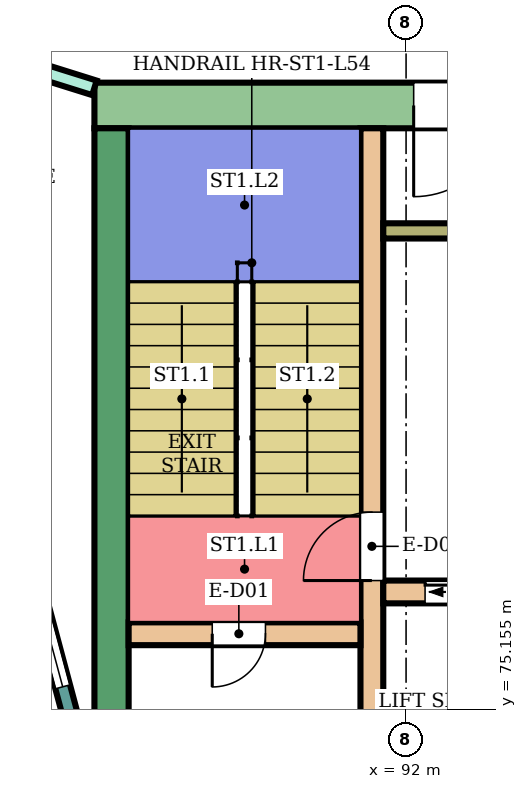
"""IFC4 building model, lengths in metres.
Left out: names, types, materials, properties, quantities, classifications, styles, units other than length and angle.
Written with IfcOpenShell. Run it as: python <this file> out.ifc"""

import sys

from ifc_helpers import new_model, si_unit, direction, frame, frame_2d, origin, place, context, subcontext, project, spatial, rectangle, extrude, element, fill, save


model = new_model("IFC4")
c1 = context("Model", 3, precision=1e-05, world=origin(), true_north=direction((0.0, 1.0)))
c2 = subcontext(c1, "Body", "Model", "MODEL_VIEW")
j1 = project(units=[si_unit("LENGTHUNIT", "METRE"), si_unit("PLANEANGLEUNIT", "RADIAN")], contexts=[c1])
p1 = place(None, origin())
s1 = spatial("IfcSite", under=j1, at=p1, CompositionType="ELEMENT")
p2 = place(p1, origin())
s2 = spatial("IfcBuilding", under=s1, at=p2, CompositionType="ELEMENT")
p3 = place(p2, frame((0.0, 0.0, 237.3)))
s3 = spatial("IfcBuildingStorey", under=s2, at=p3, CompositionType="ELEMENT", Elevation=237.3)
p4 = place(p3, frame((87.9, 83.1, 0.0), z_axis=(0.0, 0.0, 1.0), x_axis=(1.0, 0.0, 0.0)))
e1 = element("IfcWall", 1, at=p4, inside=s3, PredefinedType="SHEAR", context=c2, shape_type="SweptSolid", body=[
    extrude(rectangle(XDim=14.9, YDim=0.6, at=frame_2d((7.45, 0.0))), origin(), (0.0, 0.0, 1.0), 3.88),
])
p5 = place(p4, frame((4.2, 0.0, 0.0)))
e2 = element("IfcOpeningElement", 2, at=p5, cuts=e1, PredefinedType="OPENING", context=c2, shape_type="SweptSolid", body=[
    extrude(rectangle(XDim=2.4, YDim=2.4, at=frame_2d((1.2, 1.2))), frame((0.0, 0.31, 0.0), z_axis=(0.0, -1.0, 0.0), x_axis=(1.0, 0.0, 0.0)), (0.0, 0.0, 1.0), 0.62),
])
p6 = place(p3, frame((88.125, 75.0, 0.0), z_axis=(0.0, 0.0, 1.0), x_axis=(0.0, 1.0, 0.0)))
e3 = element("IfcWall", 3, at=p6, inside=s3, PredefinedType="SHEAR", context=c2, shape_type="SweptSolid", body=[
    extrude(rectangle(XDim=7.8, YDim=0.45, at=frame_2d((3.9, 0.0))), origin(), (0.0, 0.0, 1.0), 3.88),
])
p7 = place(p3, frame((91.55, 75.0, 0.0), z_axis=(0.0, 0.0, 1.0), x_axis=(0.0, 1.0, 0.0)))
e4 = element("IfcWall", 4, at=p7, inside=s3, PredefinedType="SHEAR", context=c2, shape_type="SweptSolid", body=[
    extrude(rectangle(XDim=7.8, YDim=0.3, at=frame_2d((3.9, 0.0))), origin(), (0.0, 0.0, 1.0), 3.88),
])
p8 = place(p7, frame((1.85, 0.0, 0.0)))
e5 = element("IfcOpeningElement", 5, at=p8, cuts=e4, PredefinedType="OPENING", context=c2, shape_type="SweptSolid", body=[
    extrude(rectangle(XDim=0.9, YDim=2.1, at=frame_2d((0.45, 1.05))), frame((0.0, 0.16, 0.0), z_axis=(0.0, -1.0, 0.0), x_axis=(1.0, 0.0, 0.0)), (0.0, 0.0, 1.0), 0.32),
])
p9 = place(p3, frame((88.35, 76.15, 0.0), z_axis=(0.0, 0.0, 1.0), x_axis=(1.0, 0.0, 0.0)))
e6 = element("IfcWall", 6, at=p9, inside=s3, PredefinedType="SHEAR", context=c2, shape_type="SweptSolid", body=[
    extrude(rectangle(XDim=3.05, YDim=0.3, at=frame_2d((1.525, 0.0))), origin(), (0.0, 0.0, 1.0), 3.88),
])
p10 = place(p9, frame((1.1, 0.0, 0.0)))
e7 = element("IfcOpeningElement", 7, at=p10, cuts=e6, PredefinedType="OPENING", context=c2, shape_type="SweptSolid", body=[
    extrude(rectangle(XDim=0.7, YDim=2.0, at=frame_2d((0.35, 1.0))), frame((0.0, 0.16, 0.0), z_axis=(0.0, -1.0, 0.0), x_axis=(1.0, 0.0, 0.0)), (0.0, 0.0, 1.0), 0.32),
])
p11 = place(p3, frame((91.7, 76.7, 0.0), z_axis=(0.0, 0.0, 1.0), x_axis=(1.0, 0.0, 0.0)))
e8 = element("IfcWall", 8, at=p11, inside=s3, PredefinedType="SHEAR", context=c2, shape_type="SweptSolid", body=[
    extrude(rectangle(XDim=11.1, YDim=0.3, at=frame_2d((5.55, 0.0))), origin(), (0.0, 0.0, 1.0), 3.88),
])
p12 = place(p11, frame((0.55, 0.0, 0.0)))
e9 = element("IfcOpeningElement", 9, at=p12, cuts=e8, PredefinedType="OPENING", context=c2, shape_type="SweptSolid", body=[
    extrude(rectangle(XDim=1.1, YDim=2.1, at=frame_2d((0.55, 1.05))), frame((0.0, 0.16, 0.0), z_axis=(0.0, -1.0, 0.0), x_axis=(1.0, 0.0, 0.0)), (0.0, 0.0, 1.0), 0.32),
])
p13 = place(p11, frame((3.0, 0.0, 0.0)))
e10 = element("IfcOpeningElement", 10, at=p13, cuts=e8, PredefinedType="OPENING", context=c2, shape_type="SweptSolid", body=[
    extrude(rectangle(XDim=1.2, YDim=2.1, at=frame_2d((0.6, 1.05))), frame((0.0, 0.16, 0.0), z_axis=(0.0, -1.0, 0.0), x_axis=(1.0, 0.0, 0.0)), (0.0, 0.0, 1.0), 0.32),
])
p14 = place(p11, frame((5.5, 0.0, 0.0)))
e11 = element("IfcOpeningElement", 11, at=p14, cuts=e8, PredefinedType="OPENING", context=c2, shape_type="SweptSolid", body=[
    extrude(rectangle(XDim=1.2, YDim=2.1, at=frame_2d((0.6, 1.05))), frame((0.0, 0.16, 0.0), z_axis=(0.0, -1.0, 0.0), x_axis=(1.0, 0.0, 0.0)), (0.0, 0.0, 1.0), 0.32),
])
p15 = place(p11, frame((7.95, 0.0, 0.0)))
e12 = element("IfcOpeningElement", 12, at=p15, cuts=e8, PredefinedType="OPENING", context=c2, shape_type="SweptSolid", body=[
    extrude(rectangle(XDim=0.9, YDim=2.1, at=frame_2d((0.45, 1.05))), frame((0.0, 0.16, 0.0), z_axis=(0.0, -1.0, 0.0), x_axis=(1.0, 0.0, 0.0)), (0.0, 0.0, 1.0), 0.32),
])
p16 = place(p11, frame((9.75, 0.0, 0.0)))
e13 = element("IfcOpeningElement", 13, at=p16, cuts=e8, PredefinedType="OPENING", context=c2, shape_type="SweptSolid", body=[
    extrude(rectangle(XDim=0.9, YDim=2.1, at=frame_2d((0.45, 1.05))), frame((0.0, 0.16, 0.0), z_axis=(0.0, -1.0, 0.0), x_axis=(1.0, 0.0, 0.0)), (0.0, 0.0, 1.0), 0.32),
])
p17 = place(p3, frame((91.7, 81.45, 0.0), z_axis=(0.0, 0.0, 1.0), x_axis=(1.0, 0.0, 0.0)))
e14 = element("IfcWall", 14, at=p17, inside=s3, PredefinedType="SHEAR", context=c2, shape_type="SweptSolid", body=[
    extrude(rectangle(XDim=4.35, YDim=0.2, at=frame_2d((2.175, 0.0))), origin(), (0.0, 0.0, 1.0), 3.88),
])
p18 = place(p3, frame((87.604, 75.0, 0.0), z_axis=(0.0, 0.0, 1.0), x_axis=(-0.258789828301, 0.965933654434, 0.0)))
e15 = element("IfcWall", 15, at=p18, inside=s3, PredefinedType="NOTDEFINED", context=c2, shape_type="SweptSolid", body=[
    extrude(rectangle(XDim=3.936, YDim=0.2, at=frame_2d((1.968, 0.0))), origin(), (0.0, 0.0, 1.0), 4.2),
])
p19 = place(p18, frame((0.468, 0.0, 0.9)))
e16 = element("IfcOpeningElement", 16, at=p19, cuts=e15, PredefinedType="OPENING", context=c2, shape_type="SweptSolid", body=[
    extrude(rectangle(XDim=3.0, YDim=2.3, at=frame_2d((1.5, 1.15))), frame((0.0, 0.11, 0.0), z_axis=(0.0, -1.0, 0.0), x_axis=(1.0, 0.0, 0.0)), (0.0, 0.0, 1.0), 0.22),
])
p20 = place(p3, frame((85.587, 84.057, 0.0), z_axis=(0.0, 0.0, 1.0), x_axis=(0.954239513179, -0.299043393987, 0.0)))
e17 = element("IfcWall", 17, at=p20, inside=s3, PredefinedType="PARTITIONING", context=c2, shape_type="SweptSolid", body=[
    extrude(rectangle(XDim=2.424, YDim=0.2, at=frame_2d((1.212, 0.0))), origin(), (0.0, 0.0, 1.0), 3.75),
])
p21 = place(p20, frame((0.762, 0.0, 0.0)))
e18 = element("IfcOpeningElement", 18, at=p21, cuts=e17, PredefinedType="OPENING", context=c2, shape_type="SweptSolid", body=[
    extrude(rectangle(XDim=0.9, YDim=2.1, at=frame_2d((0.45, 1.05))), frame((0.0, 0.11, 0.0), z_axis=(0.0, -1.0, 0.0), x_axis=(1.0, 0.0, 0.0)), (0.0, 0.0, 1.0), 0.22),
])
p22 = place(p19, origin())
e19 = element("IfcWindow", 19, at=p22, inside=s3, PartitioningType="SINGLE_PANEL", PredefinedType="WINDOW", context=c2, shape_type="SweptSolid", body=[
    extrude(rectangle(XDim=3.0, YDim=2.3, at=frame_2d((1.5, 1.15))), frame((0.0, 0.03, 0.0), z_axis=(0.0, -1.0, 0.0), x_axis=(1.0, 0.0, 0.0)), (0.0, 0.0, 1.0), 0.06),
])
fill(e16, e19)
p23 = place(p10, frame((0.7, 0.0, 0.0), z_axis=(0.0, 0.0, 1.0), x_axis=(-1.0, 0.0, 0.0)))
e20 = element("IfcDoor", 20, at=p23, inside=s3, OperationType="SINGLE_SWING_RIGHT", PredefinedType="DOOR", context=c2, shape_type="SweptSolid", body=[
    extrude(rectangle(XDim=0.7, YDim=2.0, at=frame_2d((0.35, 1.0))), frame((0.0, 0.025, 0.0), z_axis=(0.0, -1.0, 0.0), x_axis=(1.0, 0.0, 0.0)), (0.0, 0.0, 1.0), 0.05),
])
fill(e7, e20)
p24 = place(p8, origin())
e21 = element("IfcDoor", 21, at=p24, inside=s3, OperationType="SINGLE_SWING_LEFT", PredefinedType="DOOR", context=c2, shape_type="SweptSolid", body=[
    extrude(rectangle(XDim=0.9, YDim=2.1, at=frame_2d((0.45, 1.05))), frame((0.0, 0.025, 0.0), z_axis=(0.0, -1.0, 0.0), x_axis=(1.0, 0.0, 0.0)), (0.0, 0.0, 1.0), 0.05),
])
fill(e5, e21)
p25 = place(p12, origin())
e22 = element("IfcDoor", 22, at=p25, inside=s3, OperationType="DOUBLE_DOOR_SLIDING", PredefinedType="DOOR", context=c2, shape_type="SweptSolid", body=[
    extrude(rectangle(XDim=1.1, YDim=2.1, at=frame_2d((0.55, 1.05))), frame((0.0, 0.025, 0.0), z_axis=(0.0, -1.0, 0.0), x_axis=(1.0, 0.0, 0.0)), (0.0, 0.0, 1.0), 0.05),
])
fill(e9, e22)
p26 = place(p5, frame((2.4, 0.0, 0.0), z_axis=(0.0, 0.0, 1.0), x_axis=(-1.0, 0.0, 0.0)))
e23 = element("IfcDoor", 23, at=p26, inside=s3, OperationType="DOUBLE_DOOR_SINGLE_SWING", PredefinedType="DOOR", context=c2, shape_type="SweptSolid", body=[
    extrude(rectangle(XDim=2.4, YDim=2.4, at=frame_2d((1.2, 1.2))), frame((0.0, 0.025, 0.0), z_axis=(0.0, -1.0, 0.0), x_axis=(1.0, 0.0, 0.0)), (0.0, 0.0, 1.0), 0.05),
])
fill(e2, e23)
save(model, sys.argv[1])
